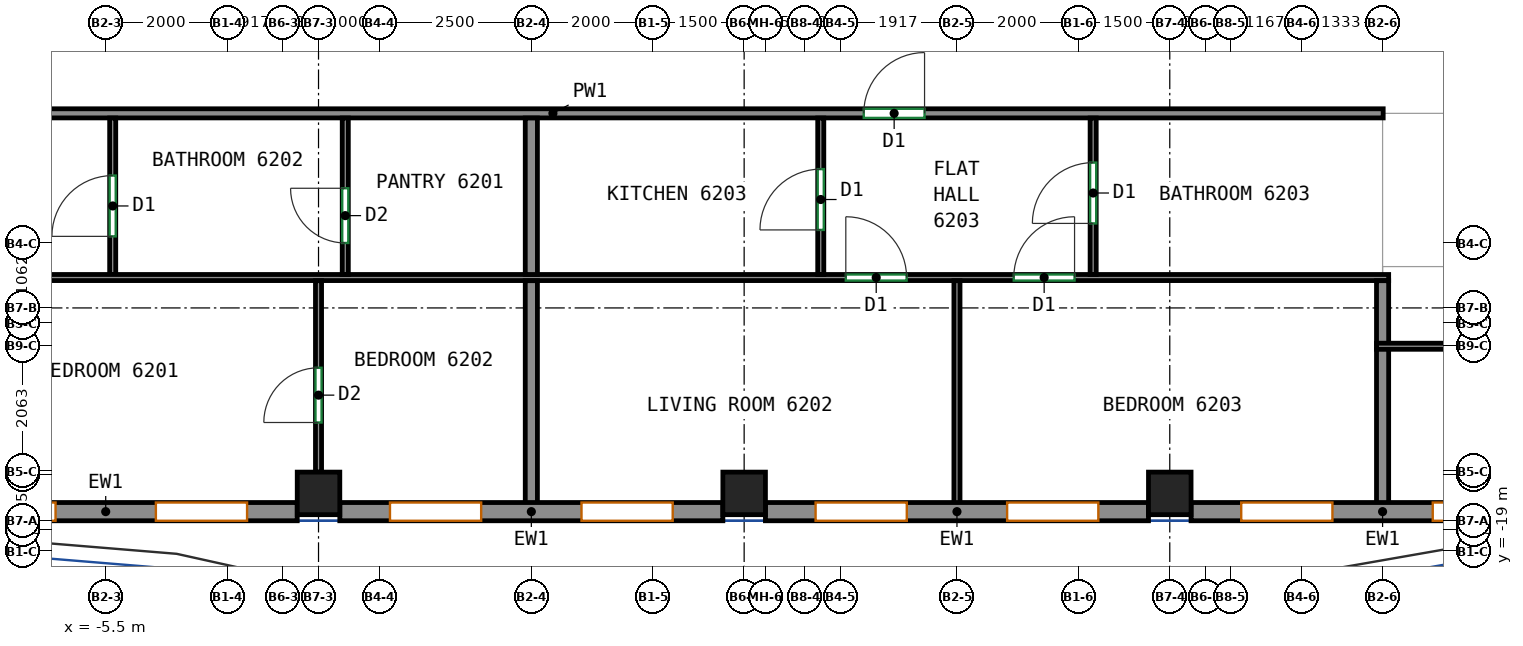
"""IFC4 building model, lengths in metres.
Left out: names, types, materials, properties, quantities, classifications, styles, units other than length and angle.
Written with IfcOpenShell. Run it as: python <this file> out.ifc"""

import sys

from ifc_helpers import new_model, si_unit, direction, frame, frame_2d, origin, origin_2d, place, context, subcontext, project, spatial, rectangle, extrude, source, transform, mapped, element, fill, save


model = new_model("IFC4")
c1 = context("Model", 3, precision=1e-05, world=origin(), true_north=direction((0.0, 1.0)))
c2 = subcontext(c1, "Body", "Model", "MODEL_VIEW")
j1 = project(units=[si_unit("LENGTHUNIT", "METRE"), si_unit("PLANEANGLEUNIT", "RADIAN")], contexts=[c1])
p1 = place(None, origin())
s1 = spatial("IfcSite", under=j1, at=p1, CompositionType="ELEMENT")
p2 = place(p1, origin())
s2 = spatial("IfcBuilding", under=s1, at=p2, CompositionType="ELEMENT")
p3 = place(p2, frame((0.0, 0.0, 256.0)))
s3 = spatial("IfcBuildingStorey", under=s2, at=p3, CompositionType="ELEMENT", Elevation=256.0)
m1 = source(origin(), c2, "Body", "SweptSolid", [
    extrude(rectangle(XDim=0.7, YDim=0.7, at=origin_2d()), origin(), (0.0, 0.0, 1.0), 3.12),
])
for number, where, z_axis, x_axis in (
    (1, (-2.0, -18.05, 0.0), (0.0, 0.0, 1.0), (1.0, 0.0, 0.0)),
    (2, (5.0, -18.05, 0.0), (0.0, 0.0, 1.0), (1.0, 0.0, 0.0)),
    (3, (12.0, -18.05, 0.0), (0.0, 0.0, 1.0), (1.0, 0.0, 0.0)),
):
    element("IfcColumn", number, at=place(p3, frame(where, z_axis=z_axis, x_axis=x_axis)), inside=s3, PredefinedType="COLUMN", context=c2, shape_type="MappedRepresentation", body=[
        mapped(m1, transform((0.0, 0.0, 0.0))),
    ])
m2 = source(origin(), c2, "Body", "SweptSolid", [
    extrude(rectangle(XDim=6.3, YDim=0.3, at=frame_2d((3.15, 0.0))), origin(), (0.0, 0.0, 1.0), 3.12),
])
p4 = place(p3, frame((-8.65, -18.35, 0.0), z_axis=(0.0, 0.0, 1.0), x_axis=(1.0, 0.0, 0.0)))
e4 = element("IfcWall", 4, at=p4, inside=s3, PredefinedType="SOLIDWALL", context=c2, shape_type="MappedRepresentation", body=[
    mapped(m2, transform((0.0, 0.0, 0.0))),
])
p5 = place(p4, frame((0.825, 0.0, 0.8)))
e5 = element("IfcOpeningElement", 5, at=p5, cuts=e4, PredefinedType="OPENING", context=c2, shape_type="SweptSolid", body=[
    extrude(rectangle(XDim=1.5, YDim=2.05, at=frame_2d((0.75, 1.025))), frame((0.0, 0.16, 0.0), z_axis=(0.0, -1.0, 0.0), x_axis=(1.0, 0.0, 0.0)), (0.0, 0.0, 1.0), 0.32),
])
p6 = place(p4, frame((3.975, 0.0, 0.8)))
e6 = element("IfcOpeningElement", 6, at=p6, cuts=e4, PredefinedType="OPENING", context=c2, shape_type="SweptSolid", body=[
    extrude(rectangle(XDim=1.5, YDim=2.05, at=frame_2d((0.75, 1.025))), frame((0.0, 0.16, 0.0), z_axis=(0.0, -1.0, 0.0), x_axis=(1.0, 0.0, 0.0)), (0.0, 0.0, 1.0), 0.32),
])
p7 = place(p3, frame((-1.65, -18.35, 0.0), z_axis=(0.0, 0.0, 1.0), x_axis=(1.0, 0.0, 0.0)))
e7 = element("IfcWall", 7, at=p7, inside=s3, PredefinedType="SOLIDWALL", context=c2, shape_type="MappedRepresentation", body=[
    mapped(m2, transform((0.0, 0.0, 0.0))),
])
p8 = place(p7, frame((0.825, 0.0, 0.8)))
e8 = element("IfcOpeningElement", 8, at=p8, cuts=e7, PredefinedType="OPENING", context=c2, shape_type="SweptSolid", body=[
    extrude(rectangle(XDim=1.5, YDim=2.05, at=frame_2d((0.75, 1.025))), frame((0.0, 0.16, 0.0), z_axis=(0.0, -1.0, 0.0), x_axis=(1.0, 0.0, 0.0)), (0.0, 0.0, 1.0), 0.32),
])
p9 = place(p7, frame((3.975, 0.0, 0.8)))
e9 = element("IfcOpeningElement", 9, at=p9, cuts=e7, PredefinedType="OPENING", context=c2, shape_type="SweptSolid", body=[
    extrude(rectangle(XDim=1.5, YDim=2.05, at=frame_2d((0.75, 1.025))), frame((0.0, 0.16, 0.0), z_axis=(0.0, -1.0, 0.0), x_axis=(1.0, 0.0, 0.0)), (0.0, 0.0, 1.0), 0.32),
])
p10 = place(p3, frame((5.35, -18.35, 0.0), z_axis=(0.0, 0.0, 1.0), x_axis=(1.0, 0.0, 0.0)))
e10 = element("IfcWall", 10, at=p10, inside=s3, PredefinedType="SOLIDWALL", context=c2, shape_type="MappedRepresentation", body=[
    mapped(m2, transform((0.0, 0.0, 0.0))),
])
p11 = place(p10, frame((0.825, 0.0, 0.8)))
e11 = element("IfcOpeningElement", 11, at=p11, cuts=e10, PredefinedType="OPENING", context=c2, shape_type="SweptSolid", body=[
    extrude(rectangle(XDim=1.5, YDim=2.05, at=frame_2d((0.75, 1.025))), frame((0.0, 0.16, 0.0), z_axis=(0.0, -1.0, 0.0), x_axis=(1.0, 0.0, 0.0)), (0.0, 0.0, 1.0), 0.32),
])
p12 = place(p10, frame((3.975, 0.0, 0.8)))
e12 = element("IfcOpeningElement", 12, at=p12, cuts=e10, PredefinedType="OPENING", context=c2, shape_type="SweptSolid", body=[
    extrude(rectangle(XDim=1.5, YDim=2.05, at=frame_2d((0.75, 1.025))), frame((0.0, 0.16, 0.0), z_axis=(0.0, -1.0, 0.0), x_axis=(1.0, 0.0, 0.0)), (0.0, 0.0, 1.0), 0.32),
])
p13 = place(p3, frame((12.35, -18.35, 0.0), z_axis=(0.0, 0.0, 1.0), x_axis=(1.0, 0.0, 0.0)))
e13 = element("IfcWall", 13, at=p13, inside=s3, PredefinedType="SOLIDWALL", context=c2, shape_type="MappedRepresentation", body=[
    mapped(m2, transform((0.0, 0.0, 0.0))),
])
p14 = place(p13, frame((0.825, 0.0, 0.8)))
e14 = element("IfcOpeningElement", 14, at=p14, cuts=e13, PredefinedType="OPENING", context=c2, shape_type="SweptSolid", body=[
    extrude(rectangle(XDim=1.5, YDim=2.05, at=frame_2d((0.75, 1.025))), frame((0.0, 0.16, 0.0), z_axis=(0.0, -1.0, 0.0), x_axis=(1.0, 0.0, 0.0)), (0.0, 0.0, 1.0), 0.32),
])
p15 = place(p13, frame((3.975, 0.0, 0.8)))
e15 = element("IfcOpeningElement", 15, at=p15, cuts=e13, PredefinedType="OPENING", context=c2, shape_type="SweptSolid", body=[
    extrude(rectangle(XDim=1.5, YDim=2.05, at=frame_2d((0.75, 1.025))), frame((0.0, 0.16, 0.0), z_axis=(0.0, -1.0, 0.0), x_axis=(1.0, 0.0, 0.0)), (0.0, 0.0, 1.0), 0.32),
])
p16 = place(p3, frame((-11.8, -11.8, 0.0), z_axis=(0.0, 0.0, 1.0), x_axis=(1.0, 0.0, 0.0)))
e16 = element("IfcWall", 16, at=p16, inside=s3, PredefinedType="PARTITIONING", context=c2, shape_type="SweptSolid", body=[
    extrude(rectangle(XDim=27.31, YDim=0.15, at=frame_2d((13.655, 0.0))), origin(), (0.0, 0.0, 1.0), 3.12),
])
p17 = place(p16, frame((4.104, 0.0, 0.0)))
e17 = element("IfcOpeningElement", 17, at=p17, cuts=e16, PredefinedType="OPENING", context=c2, shape_type="SweptSolid", body=[
    extrude(rectangle(XDim=1.0, YDim=2.1, at=frame_2d((0.5, 1.05))), frame((0.0, 0.085, 0.0), z_axis=(0.0, -1.0, 0.0), x_axis=(1.0, 0.0, 0.0)), (0.0, 0.0, 1.0), 0.17),
])
p18 = place(p16, frame((18.767, 0.0, 0.0)))
e18 = element("IfcOpeningElement", 18, at=p18, cuts=e16, PredefinedType="OPENING", context=c2, shape_type="SweptSolid", body=[
    extrude(rectangle(XDim=1.0, YDim=2.1, at=frame_2d((0.5, 1.05))), frame((0.0, 0.085, 0.0), z_axis=(0.0, -1.0, 0.0), x_axis=(1.0, 0.0, 0.0)), (0.0, 0.0, 1.0), 0.17),
])
p19 = place(p3, frame((-5.385, -14.45, 0.0), z_axis=(0.0, 0.0, 1.0), x_axis=(0.0, 1.0, 0.0)))
e19 = element("IfcWall", 19, at=p19, inside=s3, PredefinedType="PARTITIONING", context=c2, shape_type="SweptSolid", body=[
    extrude(rectangle(XDim=2.573, YDim=0.1, at=frame_2d((1.287, 0.0))), origin(), (0.0, 0.0, 1.0), 3.12),
])
p20 = place(p19, frame((0.627, 0.0, 0.0)))
e20 = element("IfcOpeningElement", 20, at=p20, cuts=e19, PredefinedType="OPENING", context=c2, shape_type="SweptSolid", body=[
    extrude(rectangle(XDim=1.0, YDim=2.1, at=frame_2d((0.5, 1.05))), frame((0.0, 0.06, 0.0), z_axis=(0.0, -1.0, 0.0), x_axis=(1.0, 0.0, 0.0)), (0.0, 0.0, 1.0), 0.12),
])
p21 = place(p3, frame((-9.06, -14.5, 0.0), z_axis=(0.0, 0.0, 1.0), x_axis=(1.0, 0.0, 0.0)))
e21 = element("IfcWall", 21, at=p21, inside=s3, PredefinedType="PARTITIONING", context=c2, shape_type="SweptSolid", body=[
    extrude(rectangle(XDim=24.66, YDim=0.1, at=frame_2d((12.33, 0.0))), origin(), (0.0, 0.0, 1.0), 3.12),
])
p22 = place(p21, frame((1.027, 0.0, 0.0)))
e22 = element("IfcOpeningElement", 22, at=p22, cuts=e21, PredefinedType="OPENING", context=c2, shape_type="SweptSolid", body=[
    extrude(rectangle(XDim=1.0, YDim=2.1, at=frame_2d((0.5, 1.05))), frame((0.0, 0.06, 0.0), z_axis=(0.0, -1.0, 0.0), x_axis=(1.0, 0.0, 0.0)), (0.0, 0.0, 1.0), 0.12),
])
p23 = place(p21, frame((15.732, 0.0, 0.0)))
e23 = element("IfcOpeningElement", 23, at=p23, cuts=e21, PredefinedType="OPENING", context=c2, shape_type="SweptSolid", body=[
    extrude(rectangle(XDim=1.0, YDim=2.1, at=frame_2d((0.5, 1.05))), frame((0.0, 0.06, 0.0), z_axis=(0.0, -1.0, 0.0), x_axis=(1.0, 0.0, 0.0)), (0.0, 0.0, 1.0), 0.12),
])
p24 = place(p21, frame((18.494, 0.0, 0.0)))
e24 = element("IfcOpeningElement", 24, at=p24, cuts=e21, PredefinedType="OPENING", context=c2, shape_type="SweptSolid", body=[
    extrude(rectangle(XDim=1.0, YDim=2.1, at=frame_2d((0.5, 1.05))), frame((0.0, 0.06, 0.0), z_axis=(0.0, -1.0, 0.0), x_axis=(1.0, 0.0, 0.0)), (0.0, 0.0, 1.0), 0.12),
])
p25 = place(p3, frame((-1.56, -14.45, 0.0), z_axis=(0.0, 0.0, 1.0), x_axis=(0.0, 1.0, 0.0)))
e25 = element("IfcWall", 25, at=p25, inside=s3, PredefinedType="PARTITIONING", context=c2, shape_type="SweptSolid", body=[
    extrude(rectangle(XDim=2.573, YDim=0.1, at=frame_2d((1.287, 0.0))), origin(), (0.0, 0.0, 1.0), 3.12),
])
p26 = place(p25, frame((0.518, 0.0, 0.0)))
e26 = element("IfcOpeningElement", 26, at=p26, cuts=e25, PredefinedType="OPENING", context=c2, shape_type="SweptSolid", body=[
    extrude(rectangle(XDim=0.9, YDim=2.1, at=frame_2d((0.45, 1.05))), frame((0.0, 0.06, 0.0), z_axis=(0.0, -1.0, 0.0), x_axis=(1.0, 0.0, 0.0)), (0.0, 0.0, 1.0), 0.12),
])
p27 = place(p3, frame((1.5, -14.45, 0.0), z_axis=(0.0, 0.0, 1.0), x_axis=(0.0, 1.0, 0.0)))
e27 = element("IfcWall", 27, at=p27, inside=s3, PredefinedType="PARTITIONING", context=c2, shape_type="SweptSolid", body=[
    extrude(rectangle(XDim=2.573, YDim=0.2, at=frame_2d((1.287, 0.0))), origin(), (0.0, 0.0, 1.0), 3.12),
])
p28 = place(p3, frame((-2.0, -17.7, 0.0), z_axis=(0.0, 0.0, 1.0), x_axis=(0.0, 1.0, 0.0)))
e28 = element("IfcWall", 28, at=p28, inside=s3, PredefinedType="PARTITIONING", context=c2, shape_type="SweptSolid", body=[
    extrude(rectangle(XDim=3.148, YDim=0.1, at=frame_2d((1.574, 0.0))), origin(), (0.0, 0.0, 1.0), 3.12),
])
p29 = place(p28, frame((0.816, 0.0, 0.0)))
e29 = element("IfcOpeningElement", 29, at=p29, cuts=e28, PredefinedType="OPENING", context=c2, shape_type="SweptSolid", body=[
    extrude(rectangle(XDim=0.9, YDim=2.1, at=frame_2d((0.45, 1.05))), frame((0.0, 0.06, 0.0), z_axis=(0.0, -1.0, 0.0), x_axis=(1.0, 0.0, 0.0)), (0.0, 0.0, 1.0), 0.12),
])
p30 = place(p3, frame((1.5, -18.25, 0.0), z_axis=(0.0, 0.0, 1.0), x_axis=(0.0, 1.0, 0.0)))
e30 = element("IfcWall", 30, at=p30, inside=s3, PredefinedType="PARTITIONING", context=c2, shape_type="SweptSolid", body=[
    extrude(rectangle(XDim=3.698, YDim=0.2, at=frame_2d((1.849, 0.0))), origin(), (0.0, 0.0, 1.0), 3.12),
])
p31 = place(p3, frame((6.26, -14.45, 0.0), z_axis=(0.0, 0.0, 1.0), x_axis=(0.0, 1.0, 0.0)))
e31 = element("IfcWall", 31, at=p31, inside=s3, PredefinedType="PARTITIONING", context=c2, shape_type="SweptSolid", body=[
    extrude(rectangle(XDim=2.573, YDim=0.1, at=frame_2d((1.287, 0.0))), origin(), (0.0, 0.0, 1.0), 3.12),
])
p32 = place(p31, frame((0.733, 0.0, 0.0)))
e32 = element("IfcOpeningElement", 32, at=p32, cuts=e31, PredefinedType="OPENING", context=c2, shape_type="SweptSolid", body=[
    extrude(rectangle(XDim=1.0, YDim=2.1, at=frame_2d((0.5, 1.05))), frame((0.0, 0.06, 0.0), z_axis=(0.0, -1.0, 0.0), x_axis=(1.0, 0.0, 0.0)), (0.0, 0.0, 1.0), 0.12),
])
p33 = place(p3, frame((10.74, -14.45, 0.0), z_axis=(0.0, 0.0, 1.0), x_axis=(0.0, 1.0, 0.0)))
e33 = element("IfcWall", 33, at=p33, inside=s3, PredefinedType="PARTITIONING", context=c2, shape_type="SweptSolid", body=[
    extrude(rectangle(XDim=2.573, YDim=0.1, at=frame_2d((1.287, 0.0))), origin(), (0.0, 0.0, 1.0), 3.12),
])
p34 = place(p33, frame((0.84, 0.0, 0.0)))
e34 = element("IfcOpeningElement", 34, at=p34, cuts=e33, PredefinedType="OPENING", context=c2, shape_type="SweptSolid", body=[
    extrude(rectangle(XDim=1.0, YDim=2.1, at=frame_2d((0.5, 1.05))), frame((0.0, 0.06, 0.0), z_axis=(0.0, -1.0, 0.0), x_axis=(1.0, 0.0, 0.0)), (0.0, 0.0, 1.0), 0.12),
])
p35 = place(p3, frame((8.5, -18.25, 0.0), z_axis=(0.0, 0.0, 1.0), x_axis=(0.0, 1.0, 0.0)))
e35 = element("IfcWall", 35, at=p35, inside=s3, PredefinedType="PARTITIONING", context=c2, shape_type="SweptSolid", body=[
    extrude(rectangle(XDim=3.698, YDim=0.1, at=frame_2d((1.849, 0.0))), origin(), (0.0, 0.0, 1.0), 3.12),
])
p36 = place(p3, frame((15.5, -18.25, 0.0), z_axis=(0.0, 0.0, 1.0), x_axis=(0.0, 1.0, 0.0)))
e36 = element("IfcWall", 36, at=p36, inside=s3, PredefinedType="PARTITIONING", context=c2, shape_type="SweptSolid", body=[
    extrude(rectangle(XDim=2.58, YDim=0.2, at=frame_2d((1.29, 0.0))), origin(), (0.0, 0.0, 1.0), 3.12),
])
p37 = place(p3, frame((15.5, -15.59, 0.0), z_axis=(0.0, 0.0, 1.0), x_axis=(0.0, 1.0, 0.0)))
e37 = element("IfcWall", 37, at=p37, inside=s3, PredefinedType="PARTITIONING", context=c2, shape_type="SweptSolid", body=[
    extrude(rectangle(XDim=1.038, YDim=0.2, at=frame_2d((0.519, 0.0))), origin(), (0.0, 0.0, 1.0), 3.12),
])
p38 = place(p3, frame((15.4, -15.63, 0.0), z_axis=(0.0, 0.0, 1.0), x_axis=(1.0, 0.0, 0.0)))
e38 = element("IfcWall", 38, at=p38, inside=s3, PredefinedType="PARTITIONING", context=c2, shape_type="SweptSolid", body=[
    extrude(rectangle(XDim=2.4, YDim=0.1, at=frame_2d((1.2, 0.0))), origin(), (0.0, 0.0, 1.0), 3.12),
])
p39 = place(p5, origin())
e39 = element("IfcWindow", 39, at=p39, inside=s3, PartitioningType="SINGLE_PANEL", PredefinedType="WINDOW", context=c2, shape_type="SweptSolid", body=[
    extrude(rectangle(XDim=1.5, YDim=2.05, at=frame_2d((0.75, 1.025))), frame((0.0, 0.03, 0.0), z_axis=(0.0, -1.0, 0.0), x_axis=(1.0, 0.0, 0.0)), (0.0, 0.0, 1.0), 0.06),
])
fill(e5, e39)
p40 = place(p6, origin())
e40 = element("IfcWindow", 40, at=p40, inside=s3, PartitioningType="SINGLE_PANEL", PredefinedType="WINDOW", context=c2, shape_type="SweptSolid", body=[
    extrude(rectangle(XDim=1.5, YDim=2.05, at=frame_2d((0.75, 1.025))), frame((0.0, 0.03, 0.0), z_axis=(0.0, -1.0, 0.0), x_axis=(1.0, 0.0, 0.0)), (0.0, 0.0, 1.0), 0.06),
])
fill(e6, e40)
p41 = place(p8, origin())
e41 = element("IfcWindow", 41, at=p41, inside=s3, PartitioningType="SINGLE_PANEL", PredefinedType="WINDOW", context=c2, shape_type="SweptSolid", body=[
    extrude(rectangle(XDim=1.5, YDim=2.05, at=frame_2d((0.75, 1.025))), frame((0.0, 0.03, 0.0), z_axis=(0.0, -1.0, 0.0), x_axis=(1.0, 0.0, 0.0)), (0.0, 0.0, 1.0), 0.06),
])
fill(e8, e41)
p42 = place(p9, origin())
e42 = element("IfcWindow", 42, at=p42, inside=s3, PartitioningType="SINGLE_PANEL", PredefinedType="WINDOW", context=c2, shape_type="SweptSolid", body=[
    extrude(rectangle(XDim=1.5, YDim=2.05, at=frame_2d((0.75, 1.025))), frame((0.0, 0.03, 0.0), z_axis=(0.0, -1.0, 0.0), x_axis=(1.0, 0.0, 0.0)), (0.0, 0.0, 1.0), 0.06),
])
fill(e9, e42)
p43 = place(p11, origin())
e43 = element("IfcWindow", 43, at=p43, inside=s3, PartitioningType="SINGLE_PANEL", PredefinedType="WINDOW", context=c2, shape_type="SweptSolid", body=[
    extrude(rectangle(XDim=1.5, YDim=2.05, at=frame_2d((0.75, 1.025))), frame((0.0, 0.03, 0.0), z_axis=(0.0, -1.0, 0.0), x_axis=(1.0, 0.0, 0.0)), (0.0, 0.0, 1.0), 0.06),
])
fill(e11, e43)
p44 = place(p12, origin())
e44 = element("IfcWindow", 44, at=p44, inside=s3, PartitioningType="SINGLE_PANEL", PredefinedType="WINDOW", context=c2, shape_type="SweptSolid", body=[
    extrude(rectangle(XDim=1.5, YDim=2.05, at=frame_2d((0.75, 1.025))), frame((0.0, 0.03, 0.0), z_axis=(0.0, -1.0, 0.0), x_axis=(1.0, 0.0, 0.0)), (0.0, 0.0, 1.0), 0.06),
])
fill(e12, e44)
p45 = place(p14, origin())
e45 = element("IfcWindow", 45, at=p45, inside=s3, PartitioningType="SINGLE_PANEL", PredefinedType="WINDOW", context=c2, shape_type="SweptSolid", body=[
    extrude(rectangle(XDim=1.5, YDim=2.05, at=frame_2d((0.75, 1.025))), frame((0.0, 0.03, 0.0), z_axis=(0.0, -1.0, 0.0), x_axis=(1.0, 0.0, 0.0)), (0.0, 0.0, 1.0), 0.06),
])
fill(e14, e45)
p46 = place(p15, origin())
e46 = element("IfcWindow", 46, at=p46, inside=s3, PartitioningType="SINGLE_PANEL", PredefinedType="WINDOW", context=c2, shape_type="SweptSolid", body=[
    extrude(rectangle(XDim=1.5, YDim=2.05, at=frame_2d((0.75, 1.025))), frame((0.0, 0.03, 0.0), z_axis=(0.0, -1.0, 0.0), x_axis=(1.0, 0.0, 0.0)), (0.0, 0.0, 1.0), 0.06),
])
fill(e15, e46)
p47 = place(p29, origin())
e47 = element("IfcDoor", 47, at=p47, inside=s3, OperationType="SINGLE_SWING_LEFT", PredefinedType="DOOR", context=c2, shape_type="SweptSolid", body=[
    extrude(rectangle(XDim=0.9, YDim=2.1, at=frame_2d((0.45, 1.05))), frame((0.0, 0.025, 0.0), z_axis=(0.0, -1.0, 0.0), x_axis=(1.0, 0.0, 0.0)), (0.0, 0.0, 1.0), 0.05),
])
fill(e29, e47)
p48 = place(p23, origin())
e48 = element("IfcDoor", 48, at=p48, inside=s3, OperationType="SINGLE_SWING_LEFT", PredefinedType="DOOR", context=c2, shape_type="SweptSolid", body=[
    extrude(rectangle(XDim=1.0, YDim=2.1, at=frame_2d((0.5, 1.05))), frame((0.0, 0.025, 0.0), z_axis=(0.0, -1.0, 0.0), x_axis=(1.0, 0.0, 0.0)), (0.0, 0.0, 1.0), 0.05),
])
fill(e23, e48)
p49 = place(p24, origin())
e49 = element("IfcDoor", 49, at=p49, inside=s3, OperationType="SINGLE_SWING_RIGHT", PredefinedType="DOOR", context=c2, shape_type="SweptSolid", body=[
    extrude(rectangle(XDim=1.0, YDim=2.1, at=frame_2d((0.5, 1.05))), frame((0.0, 0.025, 0.0), z_axis=(0.0, -1.0, 0.0), x_axis=(1.0, 0.0, 0.0)), (0.0, 0.0, 1.0), 0.05),
])
fill(e24, e49)
p50 = place(p26, origin())
e50 = element("IfcDoor", 50, at=p50, inside=s3, OperationType="SINGLE_SWING_RIGHT", PredefinedType="DOOR", context=c2, shape_type="SweptSolid", body=[
    extrude(rectangle(XDim=0.9, YDim=2.1, at=frame_2d((0.45, 1.05))), frame((0.0, 0.025, 0.0), z_axis=(0.0, -1.0, 0.0), x_axis=(1.0, 0.0, 0.0)), (0.0, 0.0, 1.0), 0.05),
])
fill(e26, e50)
p51 = place(p20, origin())
e51 = element("IfcDoor", 51, at=p51, inside=s3, OperationType="SINGLE_SWING_LEFT", PredefinedType="DOOR", context=c2, shape_type="SweptSolid", body=[
    extrude(rectangle(XDim=1.0, YDim=2.1, at=frame_2d((0.5, 1.05))), frame((0.0, 0.025, 0.0), z_axis=(0.0, -1.0, 0.0), x_axis=(1.0, 0.0, 0.0)), (0.0, 0.0, 1.0), 0.05),
])
fill(e20, e51)
p52 = place(p32, origin())
e52 = element("IfcDoor", 52, at=p52, inside=s3, OperationType="SINGLE_SWING_LEFT", PredefinedType="DOOR", context=c2, shape_type="SweptSolid", body=[
    extrude(rectangle(XDim=1.0, YDim=2.1, at=frame_2d((0.5, 1.05))), frame((0.0, 0.025, 0.0), z_axis=(0.0, -1.0, 0.0), x_axis=(1.0, 0.0, 0.0)), (0.0, 0.0, 1.0), 0.05),
])
fill(e32, e52)
p53 = place(p34, origin())
e53 = element("IfcDoor", 53, at=p53, inside=s3, OperationType="SINGLE_SWING_LEFT", PredefinedType="DOOR", context=c2, shape_type="SweptSolid", body=[
    extrude(rectangle(XDim=1.0, YDim=2.1, at=frame_2d((0.5, 1.05))), frame((0.0, 0.025, 0.0), z_axis=(0.0, -1.0, 0.0), x_axis=(1.0, 0.0, 0.0)), (0.0, 0.0, 1.0), 0.05),
])
fill(e34, e53)
p54 = place(p18, origin())
e54 = element("IfcDoor", 54, at=p54, inside=s3, OperationType="SINGLE_SWING_RIGHT", PredefinedType="DOOR", context=c2, shape_type="SweptSolid", body=[
    extrude(rectangle(XDim=1.0, YDim=2.1, at=frame_2d((0.5, 1.05))), frame((0.0, 0.025, 0.0), z_axis=(0.0, -1.0, 0.0), x_axis=(1.0, 0.0, 0.0)), (0.0, 0.0, 1.0), 0.05),
])
fill(e18, e54)
save(model, sys.argv[1])
